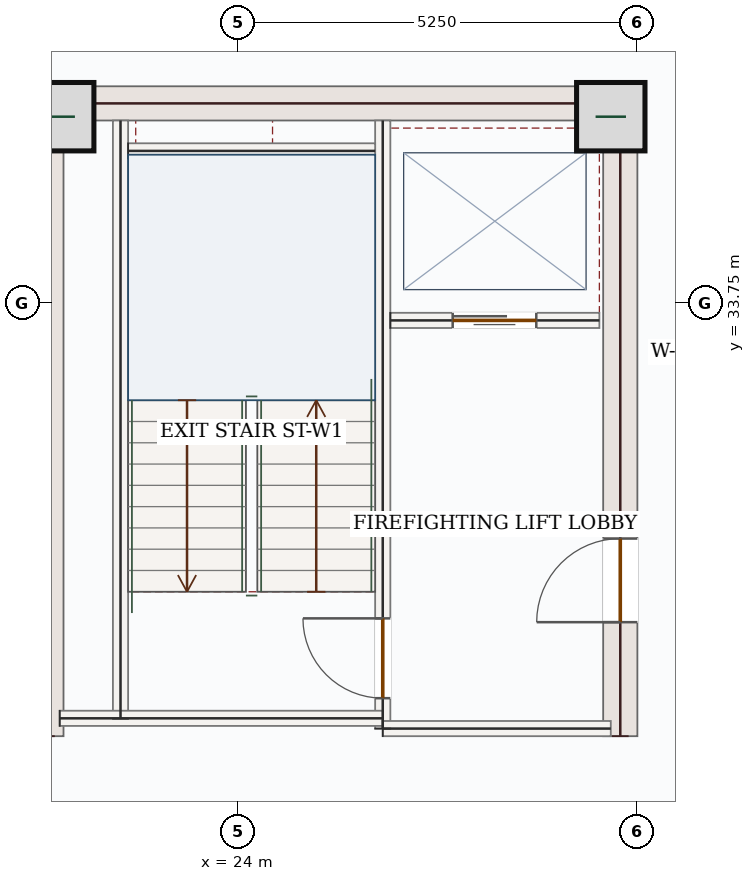
"""IFC4 building model, lengths in metres.
Left out: names, types, materials, properties, quantities, classifications, styles, units other than length and angle.
Written with IfcOpenShell. Run it as: python <this file> out.ifc"""

import sys

from ifc_helpers import new_model, si_unit, direction, frame, frame_2d, origin, origin_2d, place, context, subcontext, project, spatial, rectangle, extrude, source, transform, mapped, element, fill, save


model = new_model("IFC4")
c1 = context("Model", 3, precision=1e-05, world=origin(), true_north=direction((0.0, 1.0)))
c2 = subcontext(c1, "Body", "Model", "MODEL_VIEW")
j1 = project(units=[si_unit("LENGTHUNIT", "METRE"), si_unit("PLANEANGLEUNIT", "RADIAN")], contexts=[c1])
p1 = place(None, origin())
s1 = spatial("IfcSite", under=j1, at=p1, CompositionType="ELEMENT")
p2 = place(p1, origin())
s2 = spatial("IfcBuilding", under=s1, at=p2, CompositionType="ELEMENT")
p3 = place(p2, frame((0.0, 0.0, 342.3)))
s3 = spatial("IfcBuildingStorey", under=s2, at=p3, CompositionType="ELEMENT", Elevation=342.3)
m1 = source(origin(), c2, "Body", "SweptSolid", [
    extrude(rectangle(XDim=8.55, YDim=0.45, at=frame_2d((4.275, 0.0))), origin(), (0.0, 0.0, 1.0), 3.5),
])
p4 = place(p3, frame((21.475, 28.05, 0.0), z_axis=(0.0, 0.0, 1.0), x_axis=(0.0, 1.0, 0.0)))
e1 = element("IfcWall", 1, at=p4, inside=s3, PredefinedType="SHEAR", context=c2, shape_type="MappedRepresentation", body=[
    mapped(m1, transform((0.0, 0.0, 0.0), x_axis=(1.0, 0.0, 0.0), y_axis=(0.0, 1.0, 0.0), z_axis=(0.0, 0.0, 1.0), scale=1.0)),
])
p5 = place(p3, frame((29.025, 28.05, 0.0), z_axis=(0.0, 0.0, 1.0), x_axis=(0.0, 1.0, 0.0)))
e2 = element("IfcWall", 2, at=p5, inside=s3, PredefinedType="SHEAR", context=c2, shape_type="SweptSolid", body=[
    extrude(rectangle(XDim=8.55, YDim=0.45, at=frame_2d((4.275, 0.0))), origin(), (0.0, 0.0, 1.0), 3.5),
])
p6 = place(p5, frame((1.5, 0.0, 0.0)))
e3 = element("IfcOpeningElement", 3, at=p6, cuts=e2, PredefinedType="OPENING", context=c2, shape_type="SweptSolid", body=[
    extrude(rectangle(XDim=1.1, YDim=2.2, at=frame_2d((0.55, 1.1))), frame((0.0, 0.235, 0.0), z_axis=(0.0, -1.0, 0.0), x_axis=(1.0, 0.0, 0.0)), (0.0, 0.0, 1.0), 0.47),
])
m2 = source(origin(), c2, "Body", "SweptSolid", [
    extrude(rectangle(XDim=7.1, YDim=0.45, at=frame_2d((3.55, 0.0))), origin(), (0.0, 0.0, 1.0), 3.5),
])
p7 = place(p3, frame((21.7, 36.375, 0.0), z_axis=(0.0, 0.0, 1.0), x_axis=(1.0, 0.0, 0.0)))
e4 = element("IfcWall", 4, at=p7, inside=s3, PredefinedType="SHEAR", context=c2, shape_type="MappedRepresentation", body=[
    mapped(m2, transform((0.0, 0.0, 0.0), x_axis=(1.0, 0.0, 0.0), y_axis=(0.0, 1.0, 0.0), z_axis=(0.0, 0.0, 1.0), scale=1.0)),
])
m3 = source(origin(), c2, "Body", "SweptSolid", [
    extrude(rectangle(XDim=0.9, YDim=0.9, at=origin_2d()), origin(), (0.0, 0.0, 1.0), 3.75),
])
for number, where, z_axis, x_axis in (
    (5, (21.65, 36.2, 0.0), (0.0, 0.0, 1.0), (1.0, 0.0, 0.0)),
    (6, (28.9, 36.2, 0.0), (0.0, 0.0, 1.0), (1.0, 0.0, 0.0)),
):
    element("IfcColumn", number, at=place(p3, frame(where, z_axis=z_axis, x_axis=x_axis)), inside=s3, PredefinedType="COLUMN", context=c2, shape_type="MappedRepresentation", body=[
        mapped(m3, transform((0.0, 0.0, 0.0), x_axis=(1.0, 0.0, 0.0), y_axis=(0.0, 1.0, 0.0), z_axis=(0.0, 0.0, 1.0), scale=1.0)),
    ])
m4 = source(origin(), c2, "Body", "SweptSolid", [
    extrude(rectangle(XDim=7.87, YDim=0.2, at=frame_2d((3.935, 0.0))), origin(), (0.0, 0.0, 1.0), 3.5),
])
p8 = place(p3, frame((22.45, 28.28, 0.0), z_axis=(0.0, 0.0, 1.0), x_axis=(0.0, 1.0, 0.0)))
e7 = element("IfcWall", 7, at=p8, inside=s3, PredefinedType="SOLIDWALL", context=c2, shape_type="MappedRepresentation", body=[
    mapped(m4, transform((0.0, 0.0, 0.0), x_axis=(1.0, 0.0, 0.0), y_axis=(0.0, 1.0, 0.0), z_axis=(0.0, 0.0, 1.0), scale=1.0)),
])
p9 = place(p3, frame((25.9, 28.15, 0.0), z_axis=(0.0, 0.0, 1.0), x_axis=(0.0, 1.0, 0.0)))
e8 = element("IfcWall", 8, at=p9, inside=s3, PredefinedType="SOLIDWALL", context=c2, shape_type="SweptSolid", body=[
    extrude(rectangle(XDim=8.0, YDim=0.2, at=frame_2d((4.0, 0.0))), origin(), (0.0, 0.0, 1.0), 3.5),
])
p10 = place(p9, frame((0.4, 0.0, 0.0)))
e9 = element("IfcOpeningElement", 9, at=p10, cuts=e8, PredefinedType="OPENING", context=c2, shape_type="SweptSolid", body=[
    extrude(rectangle(XDim=1.05, YDim=2.15, at=frame_2d((0.525, 1.075))), frame((0.0, 0.11, 0.0), z_axis=(0.0, -1.0, 0.0), x_axis=(1.0, 0.0, 0.0)), (0.0, 0.0, 1.0), 0.22),
])
m5 = source(origin(), c2, "Body", "SweptSolid", [
    extrude(rectangle(XDim=4.25, YDim=0.2, at=frame_2d((2.125, 0.0))), origin(), (0.0, 0.0, 1.0), 3.5),
])
p11 = place(p3, frame((21.65, 28.285, 0.0), z_axis=(0.0, 0.0, 1.0), x_axis=(1.0, 0.0, 0.0)))
e10 = element("IfcWall", 10, at=p11, inside=s3, PredefinedType="SOLIDWALL", context=c2, shape_type="MappedRepresentation", body=[
    mapped(m5, transform((0.0, 0.0, 0.0), x_axis=(1.0, 0.0, 0.0), y_axis=(0.0, 1.0, 0.0), z_axis=(0.0, 0.0, 1.0), scale=1.0)),
])
m6 = source(origin(), c2, "Body", "SweptSolid", [
    extrude(rectangle(XDim=3.0, YDim=0.2, at=frame_2d((1.5, 0.0))), origin(), (0.0, 0.0, 1.0), 3.5),
])
p12 = place(p3, frame((25.9, 28.15, 0.0), z_axis=(0.0, 0.0, 1.0), x_axis=(1.0, 0.0, 0.0)))
e11 = element("IfcWall", 11, at=p12, inside=s3, PredefinedType="SOLIDWALL", context=c2, shape_type="MappedRepresentation", body=[
    mapped(m6, transform((0.0, 0.0, 0.0), x_axis=(1.0, 0.0, 0.0), y_axis=(0.0, 1.0, 0.0), z_axis=(0.0, 0.0, 1.0), scale=1.0)),
])
m7 = source(origin(), c2, "Body", "SweptSolid", [
    extrude(rectangle(XDim=3.25, YDim=0.2, at=frame_2d((1.625, 0.0))), origin(), (0.0, 0.0, 1.0), 3.5),
])
p13 = place(p3, frame((22.55, 35.75, 0.0), z_axis=(0.0, 0.0, 1.0), x_axis=(1.0, 0.0, 0.0)))
e12 = element("IfcWall", 12, at=p13, inside=s3, PredefinedType="SOLIDWALL", context=c2, shape_type="MappedRepresentation", body=[
    mapped(m7, transform((0.0, 0.0, 0.0), x_axis=(1.0, 0.0, 0.0), y_axis=(0.0, 1.0, 0.0), z_axis=(0.0, 0.0, 1.0), scale=1.0)),
])
p14 = place(p3, frame((26.0, 33.52, 0.0), z_axis=(0.0, 0.0, 1.0), x_axis=(1.0, 0.0, 0.0)))
e13 = element("IfcWall", 13, at=p14, inside=s3, PredefinedType="SOLIDWALL", context=c2, shape_type="SweptSolid", body=[
    extrude(rectangle(XDim=2.75, YDim=0.2, at=frame_2d((1.375, 0.0))), origin(), (0.0, 0.0, 1.0), 3.5),
])
p15 = place(p14, frame((0.82, 0.0, 0.0)))
e14 = element("IfcOpeningElement", 14, at=p15, cuts=e13, PredefinedType="OPENING", context=c2, shape_type="SweptSolid", body=[
    extrude(rectangle(XDim=1.1, YDim=2.15, at=frame_2d((0.55, 1.075))), frame((0.0, 0.11, 0.0), z_axis=(0.0, -1.0, 0.0), x_axis=(1.0, 0.0, 0.0)), (0.0, 0.0, 1.0), 0.22),
])
m8 = source(origin(), c2, "Body", "SweptSolid", [
    extrude(rectangle(XDim=1.05, YDim=2.15, at=frame_2d((0.525, 1.075))), frame((0.0, 0.025, 0.0), z_axis=(0.0, -1.0, 0.0), x_axis=(1.0, 0.0, 0.0)), (0.0, 0.0, 1.0), 0.05),
])
p16 = place(p10, origin())
e15 = element("IfcDoor", 15, at=p16, inside=s3, OperationType="SINGLE_SWING_RIGHT", PredefinedType="DOOR", context=c2, shape_type="MappedRepresentation", body=[
    mapped(m8, transform((0.0, 0.0, 0.0), x_axis=(1.0, 0.0, 0.0), y_axis=(0.0, 1.0, 0.0), z_axis=(0.0, 0.0, 1.0), scale=1.0)),
])
fill(e9, e15)
m9 = source(origin(), c2, "Body", "SweptSolid", [
    extrude(rectangle(XDim=1.1, YDim=2.15, at=frame_2d((0.55, 1.075))), frame((0.0, 0.025, 0.0), z_axis=(0.0, -1.0, 0.0), x_axis=(1.0, 0.0, 0.0)), (0.0, 0.0, 1.0), 0.05),
])
p17 = place(p15, origin())
e16 = element("IfcDoor", 16, at=p17, inside=s3, OperationType="DOUBLE_DOOR_SLIDING", PredefinedType="DOOR", context=c2, shape_type="MappedRepresentation", body=[
    mapped(m9, transform((0.0, 0.0, 0.0), x_axis=(1.0, 0.0, 0.0), y_axis=(0.0, 1.0, 0.0), z_axis=(0.0, 0.0, 1.0), scale=1.0)),
])
fill(e14, e16)
m10 = source(origin(), c2, "Body", "SweptSolid", [
    extrude(rectangle(XDim=1.1, YDim=2.2, at=frame_2d((0.55, 1.1))), frame((0.0, 0.025, 0.0), z_axis=(0.0, -1.0, 0.0), x_axis=(1.0, 0.0, 0.0)), (0.0, 0.0, 1.0), 0.05),
])
p18 = place(p6, origin())
e17 = element("IfcDoor", 17, at=p18, inside=s3, OperationType="SINGLE_SWING_LEFT", PredefinedType="DOOR", context=c2, shape_type="MappedRepresentation", body=[
    mapped(m10, transform((0.0, 0.0, 0.0), x_axis=(1.0, 0.0, 0.0), y_axis=(0.0, 1.0, 0.0), z_axis=(0.0, 0.0, 1.0), scale=1.0)),
])
fill(e3, e17)
save(model, sys.argv[1])
